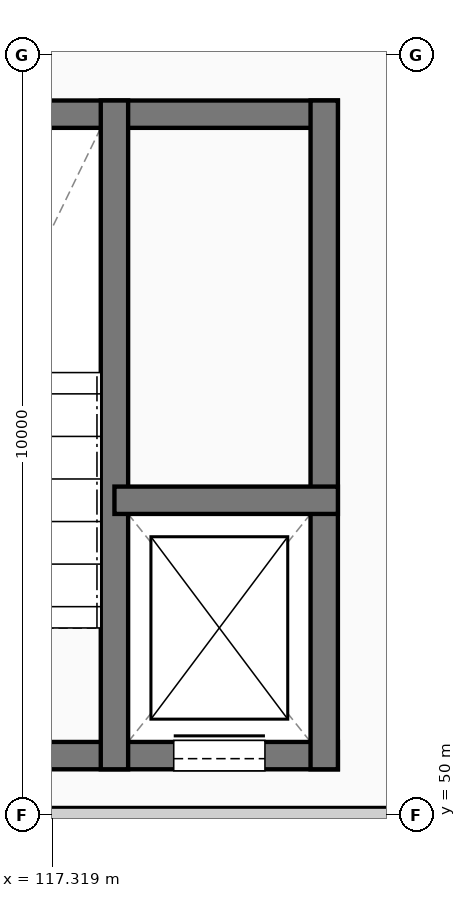
"""IFC4 building model, lengths in metres.
Left out: names, types, materials, properties, quantities, classifications, styles, units other than length and angle.
Written with IfcOpenShell. Run it as: python <this file> out.ifc"""

import sys

from ifc_helpers import new_model, si_unit, direction, frame, frame_2d, origin, place, context, subcontext, project, spatial, rectangle, extrude, element, fill, save


model = new_model("IFC4")
c1 = context("Model", 3, precision=1e-05, world=origin(), true_north=direction((0.0, 1.0)))
c2 = subcontext(c1, "Body", "Model", "MODEL_VIEW")
j1 = project(units=[si_unit("LENGTHUNIT", "METRE"), si_unit("PLANEANGLEUNIT", "RADIAN")], contexts=[c1])
p1 = place(None, origin())
s1 = spatial("IfcSite", under=j1, at=p1, CompositionType="ELEMENT")
p2 = place(p1, origin())
s2 = spatial("IfcBuilding", under=s1, at=p2, CompositionType="ELEMENT")
p3 = place(p2, frame((0.0, 0.0, 5.4)))
s3 = spatial("IfcBuildingStorey", under=s2, at=p3, CompositionType="ELEMENT", Elevation=5.4)
p4 = place(p3, frame((114.4, 50.78, 0.0), z_axis=(0.0, 0.0, 1.0), x_axis=(1.0, 0.0, 0.0)))
e1 = element("IfcWall", 1, at=p4, inside=s3, PredefinedType="SHEAR", context=c2, shape_type="SweptSolid", body=[
    extrude(rectangle(XDim=6.68, YDim=0.36, at=frame_2d((3.34, 0.0))), origin(), (0.0, 0.0, 1.0), 4.8),
])
p5 = place(p4, frame((0.51, 0.0, 0.0)))
e2 = element("IfcOpeningElement", 2, at=p5, cuts=e1, PredefinedType="OPENING", context=c2, shape_type="SweptSolid", body=[
    extrude(rectangle(XDim=1.45, YDim=2.4, at=frame_2d((0.725, 1.2))), frame((0.0, 0.19, 0.0), z_axis=(0.0, -1.0, 0.0), x_axis=(1.0, 0.0, 0.0)), (0.0, 0.0, 1.0), 0.38),
])
p6 = place(p4, frame((4.52, 0.0, 0.0)))
e3 = element("IfcOpeningElement", 3, at=p6, cuts=e1, PredefinedType="OPENING", context=c2, shape_type="SweptSolid", body=[
    extrude(rectangle(XDim=1.2, YDim=2.35, at=frame_2d((0.6, 1.175))), frame((0.0, 0.19, 0.0), z_axis=(0.0, -1.0, 0.0), x_axis=(1.0, 0.0, 0.0)), (0.0, 0.0, 1.0), 0.38),
])
p7 = place(p3, frame((114.4, 59.22, 0.0), z_axis=(0.0, 0.0, 1.0), x_axis=(1.0, 0.0, 0.0)))
e4 = element("IfcWall", 4, at=p7, inside=s3, PredefinedType="SHEAR", context=c2, shape_type="SweptSolid", body=[
    extrude(rectangle(XDim=6.68, YDim=0.36, at=frame_2d((3.34, 0.0))), origin(), (0.0, 0.0, 1.0), 4.8),
])
for number, where, z_axis, x_axis in (
    (5, (120.9, 50.6, 0.0), (0.0, 0.0, 1.0), (0.0, 1.0, 0.0)),
    (6, (118.14, 50.6, 0.0), (0.0, 0.0, 1.0), (0.0, 1.0, 0.0)),
):
    element("IfcWall", number, at=place(p3, frame(where, z_axis=z_axis, x_axis=x_axis)), inside=s3, PredefinedType="SHEAR", context=c2, shape_type="SweptSolid", body=[
        extrude(rectangle(XDim=8.8, YDim=0.36, at=frame_2d((4.4, 0.0))), origin(), (0.0, 0.0, 1.0), 4.8),
    ])
p8 = place(p3, frame((118.14, 54.14, 0.0), z_axis=(0.0, 0.0, 1.0), x_axis=(1.0, 0.0, 0.0)))
e7 = element("IfcWall", 7, at=p8, inside=s3, PredefinedType="SHEAR", context=c2, shape_type="SweptSolid", body=[
    extrude(rectangle(XDim=2.94, YDim=0.36, at=frame_2d((1.47, 0.0))), origin(), (0.0, 0.0, 1.0), 4.8),
])
p9 = place(p3, frame((53.8, 50.0, 0.0), z_axis=(0.0, 0.0, 1.0), x_axis=(1.0, 0.0, 0.0)))
e8 = element("IfcWall", 8, at=p9, inside=s3, PredefinedType="PARTITIONING", context=c2, shape_type="SweptSolid", body=[
    extrude(rectangle(XDim=68.4, YDim=0.2, at=frame_2d((34.2, 0.0))), origin(), (0.0, 0.0, 1.0), 4.02),
])
p10 = place(p9, frame((14.332, 0.0, 0.0)))
e9 = element("IfcOpeningElement", 9, at=p10, cuts=e8, PredefinedType="OPENING", context=c2, shape_type="SweptSolid", body=[
    extrude(rectangle(XDim=2.8, YDim=2.7, at=frame_2d((1.4, 1.35))), frame((0.0, 0.11, 0.0), z_axis=(0.0, -1.0, 0.0), x_axis=(1.0, 0.0, 0.0)), (0.0, 0.0, 1.0), 0.22),
])
p11 = place(p9, frame((32.8, 0.0, 0.0)))
e10 = element("IfcOpeningElement", 10, at=p11, cuts=e8, PredefinedType="OPENING", context=c2, shape_type="SweptSolid", body=[
    extrude(rectangle(XDim=2.8, YDim=2.7, at=frame_2d((1.4, 1.35))), frame((0.0, 0.11, 0.0), z_axis=(0.0, -1.0, 0.0), x_axis=(1.0, 0.0, 0.0)), (0.0, 0.0, 1.0), 0.22),
])
p12 = place(p9, frame((51.268, 0.0, 0.0)))
e11 = element("IfcOpeningElement", 11, at=p12, cuts=e8, PredefinedType="OPENING", context=c2, shape_type="SweptSolid", body=[
    extrude(rectangle(XDim=2.8, YDim=2.7, at=frame_2d((1.4, 1.35))), frame((0.0, 0.11, 0.0), z_axis=(0.0, -1.0, 0.0), x_axis=(1.0, 0.0, 0.0)), (0.0, 0.0, 1.0), 0.22),
])
p13 = place(p6, origin())
e12 = element("IfcDoor", 12, at=p13, inside=s3, OperationType="SLIDING_TO_LEFT", PredefinedType="DOOR", context=c2, shape_type="SweptSolid", body=[
    extrude(rectangle(XDim=1.2, YDim=2.35, at=frame_2d((0.6, 1.175))), frame((0.0, 0.025, 0.0), z_axis=(0.0, -1.0, 0.0), x_axis=(1.0, 0.0, 0.0)), (0.0, 0.0, 1.0), 0.05),
])
fill(e3, e12)
save(model, sys.argv[1])
